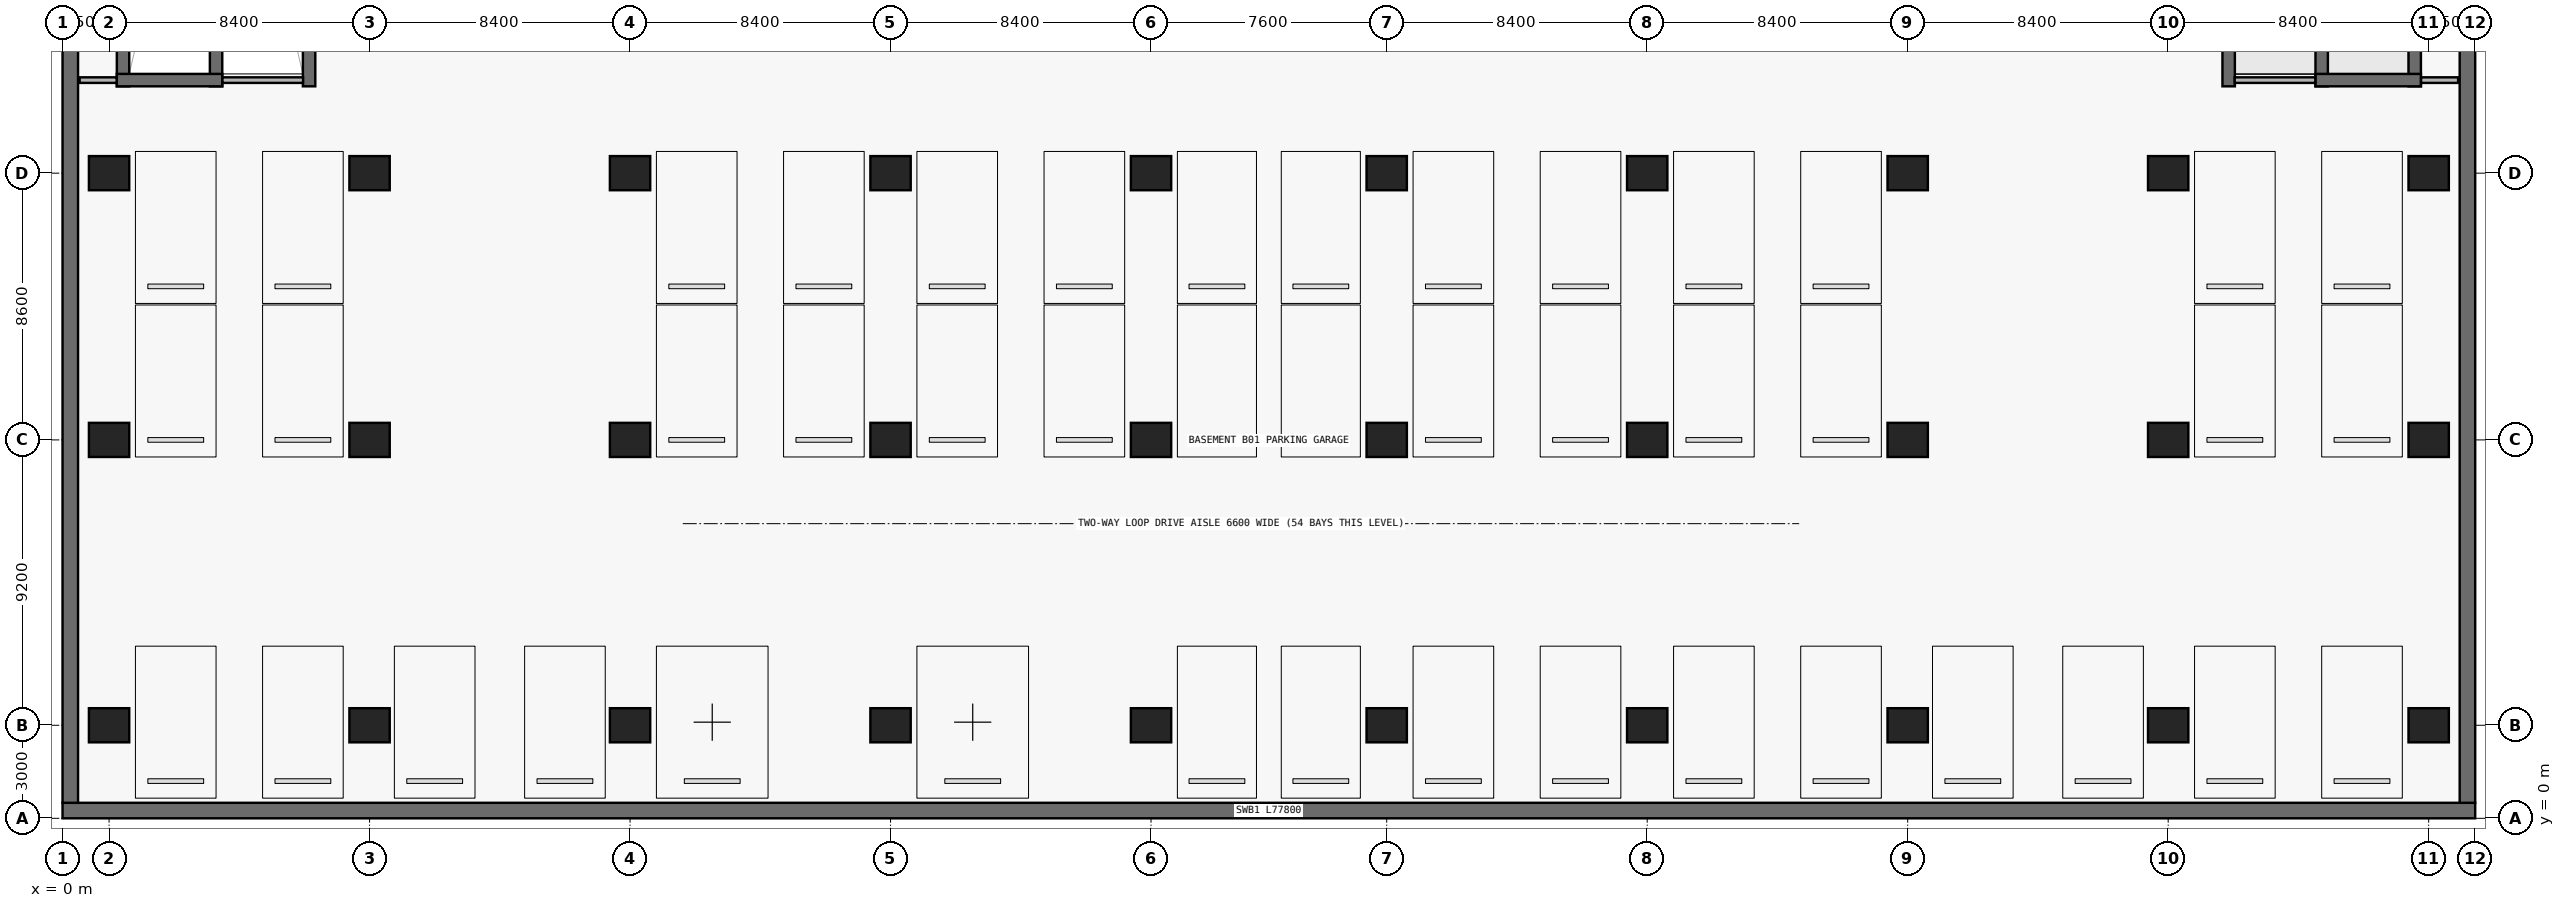
"""IFC4 building model, lengths in metres.
Left out: names, types, materials, properties, quantities, classifications, styles, units other than length and angle.
Written with IfcOpenShell. Run it as: python <this file> out.ifc"""

import sys

from ifc_helpers import new_model, si_unit, direction, frame, frame_2d, origin, origin_2d, place, context, subcontext, project, spatial, rectangle, extrude, element, save


model = new_model("IFC4")
c1 = context("Model", 3, precision=1e-05, world=origin(), true_north=direction((0.0, 1.0)))
c2 = subcontext(c1, "Body", "Model", "MODEL_VIEW")
j1 = project(units=[si_unit("LENGTHUNIT", "METRE"), si_unit("PLANEANGLEUNIT", "RADIAN")], contexts=[c1])
p1 = place(None, origin())
s1 = spatial("IfcSite", under=j1, at=p1, CompositionType="ELEMENT")
p2 = place(p1, origin())
s2 = spatial("IfcBuilding", under=s1, at=p2, CompositionType="ELEMENT")
p3 = place(p2, frame((0.0, 0.0, -4.5)))
s3 = spatial("IfcBuildingStorey", under=s2, at=p3, CompositionType="ELEMENT", Elevation=-4.5)
p4 = place(p3, frame((77.8, 0.25, 0.0), z_axis=(0.0, 0.0, 1.0), x_axis=(-1.0, 0.0, 0.0)))
e1 = element("IfcWall", 1, at=p4, inside=s3, PredefinedType="SOLIDWALL", context=c2, shape_type="SweptSolid", body=[
    extrude(rectangle(XDim=77.8, YDim=0.5, at=frame_2d((38.9, 0.0))), origin(), (0.0, 0.0, 1.0), 4.2),
])
for number, where, z_axis, x_axis in (
    (2, (0.25, 0.5, 0.0), (0.0, 0.0, 1.0), (0.0, 1.0, 0.0)),
    (3, (77.55, 53.3, 0.0), (0.0, 0.0, 1.0), (0.0, -1.0, 0.0)),
):
    element("IfcWall", number, at=place(p3, frame(where, z_axis=z_axis, x_axis=x_axis)), inside=s3, PredefinedType="SOLIDWALL", context=c2, shape_type="SweptSolid", body=[
        extrude(rectangle(XDim=52.8, YDim=0.5, at=frame_2d((26.4, 0.0))), origin(), (0.0, 0.0, 1.0), 4.2),
    ])
for number, where, z_axis, x_axis in (
    (4, (1.95, 23.6, 0.0), (0.0, 0.0, 1.0), (0.0, 1.0, 0.0)),
    (5, (7.95, 23.6, 0.0), (0.0, 0.0, 1.0), (0.0, 1.0, 0.0)),
):
    element("IfcWall", number, at=place(p3, frame(where, z_axis=z_axis, x_axis=x_axis)), inside=s3, PredefinedType="SHEAR", context=c2, shape_type="SweptSolid", body=[
        extrude(rectangle(XDim=24.2, YDim=0.4, at=frame_2d((12.1, 0.0))), origin(), (0.0, 0.0, 1.0), 4.2),
    ])
p5 = place(p3, frame((4.95, 23.6, -0.3), z_axis=(0.0, 0.0, 1.0), x_axis=(0.0, 1.0, 0.0)))
e6 = element("IfcWall", 6, at=p5, inside=s3, PredefinedType="SHEAR", context=c2, shape_type="SweptSolid", body=[
    extrude(rectangle(XDim=18.4, YDim=0.4, at=frame_2d((9.2, 0.0))), origin(), (0.0, 0.0, 1.0), 4.5),
])
p6 = place(p3, frame((1.75, 23.8, 0.0), z_axis=(0.0, 0.0, 1.0), x_axis=(1.0, 0.0, 0.0)))
e7 = element("IfcWall", 7, at=p6, inside=s3, PredefinedType="SHEAR", context=c2, shape_type="SweptSolid", body=[
    extrude(rectangle(XDim=3.4, YDim=0.4, at=frame_2d((1.7, 0.0))), origin(), (0.0, 0.0, 1.0), 4.2),
])
for number, where, z_axis, x_axis in (
    (8, (69.85, 23.6, 0.0), (0.0, 0.0, 1.0), (0.0, 1.0, 0.0)),
    (9, (75.85, 23.6, 0.0), (0.0, 0.0, 1.0), (0.0, 1.0, 0.0)),
):
    element("IfcWall", number, at=place(p3, frame(where, z_axis=z_axis, x_axis=x_axis)), inside=s3, PredefinedType="SHEAR", context=c2, shape_type="SweptSolid", body=[
        extrude(rectangle(XDim=24.2, YDim=0.4, at=frame_2d((12.1, 0.0))), origin(), (0.0, 0.0, 1.0), 4.2),
    ])
p7 = place(p3, frame((72.85, 23.6, 0.0), z_axis=(0.0, 0.0, 1.0), x_axis=(0.0, 1.0, 0.0)))
e10 = element("IfcWall", 10, at=p7, inside=s3, PredefinedType="SHEAR", context=c2, shape_type="SweptSolid", body=[
    extrude(rectangle(XDim=18.4, YDim=0.4, at=frame_2d((9.2, 0.0))), origin(), (0.0, 0.0, 1.0), 4.2),
])
p8 = place(p3, frame((72.65, 23.8, 0.0), z_axis=(0.0, 0.0, 1.0), x_axis=(1.0, 0.0, 0.0)))
e11 = element("IfcWall", 11, at=p8, inside=s3, PredefinedType="SHEAR", context=c2, shape_type="SweptSolid", body=[
    extrude(rectangle(XDim=3.4, YDim=0.4, at=frame_2d((1.7, 0.0))), origin(), (0.0, 0.0, 1.0), 4.2),
])
for number, where, z_axis, x_axis in (
    (12, (1.5, 3.0, 0.0), (0.0, 0.0, 1.0), (1.0, 0.0, 0.0)),
    (13, (9.9, 3.0, 0.0), (0.0, 0.0, 1.0), (1.0, 0.0, 0.0)),
    (14, (18.3, 3.0, 0.0), (0.0, 0.0, 1.0), (1.0, 0.0, 0.0)),
    (15, (26.7, 3.0, 0.0), (0.0, 0.0, 1.0), (1.0, 0.0, 0.0)),
    (16, (35.1, 3.0, 0.0), (0.0, 0.0, 1.0), (1.0, 0.0, 0.0)),
    (17, (42.7, 3.0, 0.0), (0.0, 0.0, 1.0), (1.0, 0.0, 0.0)),
    (18, (51.1, 3.0, 0.0), (0.0, 0.0, 1.0), (1.0, 0.0, 0.0)),
    (19, (59.5, 3.0, 0.0), (0.0, 0.0, 1.0), (1.0, 0.0, 0.0)),
    (20, (67.9, 3.0, 0.0), (0.0, 0.0, 1.0), (1.0, 0.0, 0.0)),
    (21, (76.3, 3.0, 0.0), (0.0, 0.0, 1.0), (1.0, 0.0, 0.0)),
    (22, (1.5, 12.2, 0.0), (0.0, 0.0, 1.0), (1.0, 0.0, 0.0)),
    (23, (9.9, 12.2, 0.0), (0.0, 0.0, 1.0), (1.0, 0.0, 0.0)),
    (24, (18.3, 12.2, 0.0), (0.0, 0.0, 1.0), (1.0, 0.0, 0.0)),
    (25, (26.7, 12.2, 0.0), (0.0, 0.0, 1.0), (1.0, 0.0, 0.0)),
    (26, (35.1, 12.2, 0.0), (0.0, 0.0, 1.0), (1.0, 0.0, 0.0)),
    (27, (42.7, 12.2, 0.0), (0.0, 0.0, 1.0), (1.0, 0.0, 0.0)),
    (28, (51.1, 12.2, 0.0), (0.0, 0.0, 1.0), (1.0, 0.0, 0.0)),
    (29, (59.5, 12.2, 0.0), (0.0, 0.0, 1.0), (1.0, 0.0, 0.0)),
    (30, (67.9, 12.2, 0.0), (0.0, 0.0, 1.0), (1.0, 0.0, 0.0)),
    (31, (76.3, 12.2, 0.0), (0.0, 0.0, 1.0), (1.0, 0.0, 0.0)),
    (32, (1.5, 20.8, 0.0), (0.0, 0.0, 1.0), (1.0, 0.0, 0.0)),
    (33, (9.9, 20.8, 0.0), (0.0, 0.0, 1.0), (1.0, 0.0, 0.0)),
    (34, (18.3, 20.8, 0.0), (0.0, 0.0, 1.0), (1.0, 0.0, 0.0)),
    (35, (26.7, 20.8, 0.0), (0.0, 0.0, 1.0), (1.0, 0.0, 0.0)),
    (36, (35.1, 20.8, 0.0), (0.0, 0.0, 1.0), (1.0, 0.0, 0.0)),
    (37, (42.7, 20.8, 0.0), (0.0, 0.0, 1.0), (1.0, 0.0, 0.0)),
    (38, (51.1, 20.8, 0.0), (0.0, 0.0, 1.0), (1.0, 0.0, 0.0)),
    (39, (59.5, 20.8, 0.0), (0.0, 0.0, 1.0), (1.0, 0.0, 0.0)),
    (40, (67.9, 20.8, 0.0), (0.0, 0.0, 1.0), (1.0, 0.0, 0.0)),
    (41, (76.3, 20.8, 0.0), (0.0, 0.0, 1.0), (1.0, 0.0, 0.0)),
):
    element("IfcColumn", number, at=place(p3, frame(where, z_axis=z_axis, x_axis=x_axis)), inside=s3, PredefinedType="COLUMN", context=c2, shape_type="SweptSolid", body=[
        extrude(rectangle(XDim=1.3, YDim=1.1, at=origin_2d()), origin(), (0.0, 0.0, 1.0), 4.2),
    ])
p9 = place(p3, frame((0.55, 23.8, 0.0), z_axis=(0.0, 0.0, 1.0), x_axis=(1.0, 0.0, 0.0)))
e42 = element("IfcWall", 42, at=p9, inside=s3, PredefinedType="PARTITIONING", context=c2, shape_type="SweptSolid", body=[
    extrude(rectangle(XDim=1.195, YDim=0.18, at=frame_2d((0.598, 0.0))), origin(), (0.0, 0.0, 1.0), 4.2),
])
p10 = place(p3, frame((5.155, 23.8, 0.0), z_axis=(0.0, 0.0, 1.0), x_axis=(1.0, 0.0, 0.0)))
e43 = element("IfcWall", 43, at=p10, inside=s3, PredefinedType="PARTITIONING", context=c2, shape_type="SweptSolid", body=[
    extrude(rectangle(XDim=2.6, YDim=0.18, at=frame_2d((1.3, 0.0))), origin(), (0.0, 0.0, 1.0), 4.2),
])
p11 = place(p3, frame((70.045, 23.8, 0.0), z_axis=(0.0, 0.0, 1.0), x_axis=(1.0, 0.0, 0.0)))
e44 = element("IfcWall", 44, at=p11, inside=s3, PredefinedType="PARTITIONING", context=c2, shape_type="SweptSolid", body=[
    extrude(rectangle(XDim=2.6, YDim=0.18, at=frame_2d((1.3, 0.0))), origin(), (0.0, 0.0, 1.0), 4.2),
])
p12 = place(p3, frame((76.055, 23.8, 0.0), z_axis=(0.0, 0.0, 1.0), x_axis=(1.0, 0.0, 0.0)))
e45 = element("IfcWall", 45, at=p12, inside=s3, PredefinedType="PARTITIONING", context=c2, shape_type="SweptSolid", body=[
    extrude(rectangle(XDim=1.195, YDim=0.18, at=frame_2d((0.598, 0.0))), origin(), (0.0, 0.0, 1.0), 4.2),
])
save(model, sys.argv[1])
